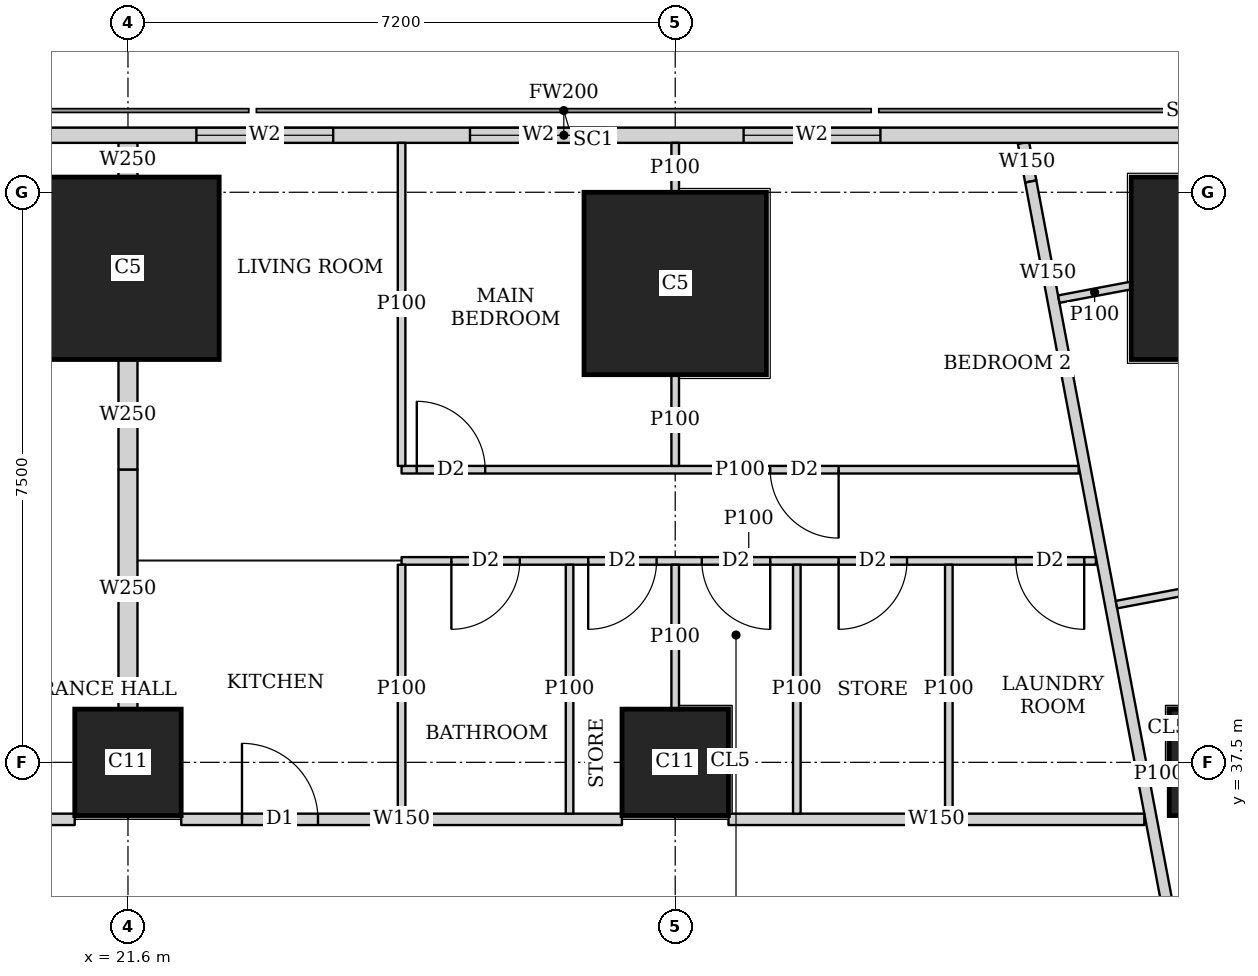
"""IFC4 building model, lengths in metres.
Left out: names, types, materials, properties, quantities, classifications, styles, units other than length and angle.
Written with IfcOpenShell. Run it as: python <this file> out.ifc"""

import sys

from ifc_helpers import new_model, si_unit, direction, frame, frame_2d, origin, origin_2d, place, context, subcontext, project, spatial, rectangle, extrude, element, fill, save


model = new_model("IFC4")
c1 = context("Model", 3, precision=1e-05, world=origin(), true_north=direction((0.0, 1.0)))
c2 = subcontext(c1, "Body", "Model", "MODEL_VIEW")
j1 = project(units=[si_unit("LENGTHUNIT", "METRE"), si_unit("PLANEANGLEUNIT", "RADIAN")], contexts=[c1])
p1 = place(None, origin())
s1 = spatial("IfcSite", under=j1, at=p1, CompositionType="ELEMENT")
p2 = place(p1, origin())
s2 = spatial("IfcBuilding", under=s1, at=p2, CompositionType="ELEMENT")
p3 = place(p2, frame((0.0, 0.0, 242.45)))
s3 = spatial("IfcBuildingStorey", under=s2, at=p3, CompositionType="ELEMENT", Elevation=242.45)
for number, where, z_axis, x_axis in (
    (1, (21.6, 37.5, 0.0), (0.0, 0.0, 1.0), (1.0, 0.0, 0.0)),
    (2, (28.8, 37.5, 0.0), (0.0, 0.0, 1.0), (1.0, 0.0, 0.0)),
    (3, (36.0, 37.5, 0.0), (0.0, 0.0, 1.0), (1.0, 0.0, 0.0)),
):
    element("IfcColumn", number, at=place(p3, frame(where, z_axis=z_axis, x_axis=x_axis)), inside=s3, PredefinedType="COLUMN", context=c2, shape_type="SweptSolid", body=[
        extrude(rectangle(XDim=1.4, YDim=1.4, at=origin_2d()), origin(), (0.0, 0.0, 1.0), 3.75),
    ])
for number, where, z_axis, x_axis in (
    (4, (21.6, 44.0, 0.0), (0.0, 0.0, 1.0), (1.0, 0.0, 0.0)),
    (5, (28.8, 43.8, 0.0), (0.0, 0.0, 1.0), (1.0, 0.0, 0.0)),
    (6, (36.0, 44.0, 0.0), (0.0, 0.0, 1.0), (1.0, 0.0, 0.0)),
):
    element("IfcColumn", number, at=place(p3, frame(where, z_axis=z_axis, x_axis=x_axis)), inside=s3, PredefinedType="COLUMN", context=c2, shape_type="SweptSolid", body=[
        extrude(rectangle(XDim=2.4, YDim=2.4, at=origin_2d()), origin(), (0.0, 0.0, 1.0), 3.75),
    ])
p4 = place(p3, frame((40.106, 45.75, 0.0), z_axis=(0.0, 0.0, 1.0), x_axis=(-1.0, 0.0, 0.0)))
e7 = element("IfcWall", 7, at=p4, inside=s3, PredefinedType="SOLIDWALL", context=c2, shape_type="SweptSolid", body=[
    extrude(rectangle(XDim=25.543, YDim=0.2, at=frame_2d((12.771, 0.0))), origin(), (0.0, 0.0, 1.0), 3.45),
])
p5 = place(p4, frame((8.606, 0.0, 0.9)))
e8 = element("IfcOpeningElement", 8, at=p5, cuts=e7, PredefinedType="OPENING", context=c2, shape_type="SweptSolid", body=[
    extrude(rectangle(XDim=1.8, YDim=1.5, at=frame_2d((0.9, 0.75))), frame((0.0, 0.11, 0.0), z_axis=(0.0, -1.0, 0.0), x_axis=(1.0, 0.0, 0.0)), (0.0, 0.0, 1.0), 0.22),
])
p6 = place(p4, frame((12.206, 0.0, 0.9)))
e9 = element("IfcOpeningElement", 9, at=p6, cuts=e7, PredefinedType="OPENING", context=c2, shape_type="SweptSolid", body=[
    extrude(rectangle(XDim=1.8, YDim=1.5, at=frame_2d((0.9, 0.75))), frame((0.0, 0.11, 0.0), z_axis=(0.0, -1.0, 0.0), x_axis=(1.0, 0.0, 0.0)), (0.0, 0.0, 1.0), 0.22),
])
p7 = place(p4, frame((15.806, 0.0, 0.9)))
e10 = element("IfcOpeningElement", 10, at=p7, cuts=e7, PredefinedType="OPENING", context=c2, shape_type="SweptSolid", body=[
    extrude(rectangle(XDim=1.8, YDim=1.5, at=frame_2d((0.9, 0.75))), frame((0.0, 0.11, 0.0), z_axis=(0.0, -1.0, 0.0), x_axis=(1.0, 0.0, 0.0)), (0.0, 0.0, 1.0), 0.22),
])
p8 = place(p4, frame((20.825, 0.0, 0.9)))
e11 = element("IfcOpeningElement", 11, at=p8, cuts=e7, PredefinedType="OPENING", context=c2, shape_type="SweptSolid", body=[
    extrude(rectangle(XDim=2.4, YDim=1.5, at=frame_2d((1.2, 0.75))), frame((0.0, 0.11, 0.0), z_axis=(0.0, -1.0, 0.0), x_axis=(1.0, 0.0, 0.0)), (0.0, 0.0, 1.0), 0.22),
])
p9 = place(p3, frame((16.201, 36.75, 0.0), z_axis=(0.0, 0.0, 1.0), x_axis=(1.0, 0.0, 0.0)))
e12 = element("IfcWall", 12, at=p9, inside=s3, PredefinedType="SOLIDWALL", context=c2, shape_type="SweptSolid", body=[
    extrude(rectangle(XDim=4.698, YDim=0.15, at=frame_2d((2.349, 0.0))), origin(), (0.0, 0.0, 1.0), 3.45),
])
p10 = place(p9, frame((0.353, 0.0, 0.0)))
e13 = element("IfcOpeningElement", 13, at=p10, cuts=e12, PredefinedType="OPENING", context=c2, shape_type="SweptSolid", body=[
    extrude(rectangle(XDim=1.0, YDim=2.1, at=frame_2d((0.5, 1.05))), frame((0.0, 0.085, 0.0), z_axis=(0.0, -1.0, 0.0), x_axis=(1.0, 0.0, 0.0)), (0.0, 0.0, 1.0), 0.17),
])
p11 = place(p3, frame((22.301, 36.75, 0.0), z_axis=(0.0, 0.0, 1.0), x_axis=(1.0, 0.0, 0.0)))
e14 = element("IfcWall", 14, at=p11, inside=s3, PredefinedType="SOLIDWALL", context=c2, shape_type="SweptSolid", body=[
    extrude(rectangle(XDim=5.798, YDim=0.15, at=frame_2d((2.899, 0.0))), origin(), (0.0, 0.0, 1.0), 3.45),
])
p12 = place(p11, frame((0.799, 0.0, 0.0)))
e15 = element("IfcOpeningElement", 15, at=p12, cuts=e14, PredefinedType="OPENING", context=c2, shape_type="SweptSolid", body=[
    extrude(rectangle(XDim=1.0, YDim=2.1, at=frame_2d((0.5, 1.05))), frame((0.0, 0.085, 0.0), z_axis=(0.0, -1.0, 0.0), x_axis=(1.0, 0.0, 0.0)), (0.0, 0.0, 1.0), 0.17),
])
p13 = place(p3, frame((29.501, 36.75, 0.0), z_axis=(0.0, 0.0, 1.0), x_axis=(1.0, 0.0, 0.0)))
e16 = element("IfcWall", 16, at=p13, inside=s3, PredefinedType="SOLIDWALL", context=c2, shape_type="SweptSolid", body=[
    extrude(rectangle(XDim=5.471, YDim=0.15, at=frame_2d((2.735, 0.0))), origin(), (0.0, 0.0, 1.0), 3.45),
])
p14 = place(p3, frame((33.382, 45.65, 0.0), z_axis=(0.0, 0.0, 1.0), x_axis=(0.185657456326, -0.982614527122, 0.0)))
e17 = element("IfcWall", 17, at=p14, inside=s3, PredefinedType="SOLIDWALL", context=c2, shape_type="SweptSolid", body=[
    extrude(rectangle(XDim=0.517, YDim=0.15, at=frame_2d((0.258, 0.0))), origin(), (0.0, 0.0, 1.0), 3.45),
])
p15 = place(p3, frame((33.478, 45.142, 0.0), z_axis=(0.0, 0.0, 1.0), x_axis=(0.185393362436, -0.982664388876, 0.0)))
e18 = element("IfcWall", 18, at=p15, inside=s3, PredefinedType="SOLIDWALL", context=c2, shape_type="SweptSolid", body=[
    extrude(rectangle(XDim=2.455, YDim=0.15, at=frame_2d((1.227, 0.0))), origin(), (0.0, 0.0, 1.0), 2.0),
])
p16 = place(p3, frame((33.933, 42.73, 0.0), z_axis=(0.0, 0.0, 1.0), x_axis=(0.185595417643, -0.982626246825, 0.0)))
e19 = element("IfcWall", 19, at=p16, inside=s3, PredefinedType="SOLIDWALL", context=c2, shape_type="SweptSolid", body=[
    extrude(rectangle(XDim=41.051, YDim=0.15, at=frame_2d((20.525, 0.0))), origin(), (0.0, 0.0, 1.0), 2.45),
])
p17 = place(p16, frame((12.266, 0.0, 0.0)))
e20 = element("IfcOpeningElement", 20, at=p17, cuts=e19, PredefinedType="OPENING", context=c2, shape_type="SweptSolid", body=[
    extrude(rectangle(XDim=1.0, YDim=2.1, at=frame_2d((0.5, 1.05))), frame((0.0, 0.085, 0.0), z_axis=(0.0, -1.0, 0.0), x_axis=(1.0, 0.0, 0.0)), (0.0, 0.0, 1.0), 0.17),
])
p18 = place(p16, frame((16.082, 0.0, 0.0)))
e21 = element("IfcOpeningElement", 21, at=p18, cuts=e19, PredefinedType="OPENING", context=c2, shape_type="SweptSolid", body=[
    extrude(rectangle(XDim=1.0, YDim=2.1, at=frame_2d((0.5, 1.05))), frame((0.0, 0.085, 0.0), z_axis=(0.0, -1.0, 0.0), x_axis=(1.0, 0.0, 0.0)), (0.0, 0.0, 1.0), 0.17),
])
p19 = place(p16, frame((30.862, 0.0, 0.0)))
e22 = element("IfcOpeningElement", 22, at=p19, cuts=e19, PredefinedType="OPENING", context=c2, shape_type="SweptSolid", body=[
    extrude(rectangle(XDim=1.0, YDim=2.1, at=frame_2d((0.5, 1.05))), frame((0.0, 0.085, 0.0), z_axis=(0.0, -1.0, 0.0), x_axis=(1.0, 0.0, 0.0)), (0.0, 0.0, 1.0), 0.17),
])
p20 = place(p3, frame((34.79, 43.772, 0.0), z_axis=(0.0, 0.0, 1.0), x_axis=(-0.982655532093, -0.185440301034, 0.0)))
e23 = element("IfcWall", 23, at=p20, inside=s3, PredefinedType="PARTITIONING", context=c2, shape_type="SweptSolid", body=[
    extrude(rectangle(XDim=0.96, YDim=0.1, at=frame_2d((0.48, 0.0))), origin(), (0.0, 0.0, 1.0), 2.0),
])
p21 = place(p3, frame((37.823, 40.182, 0.0), z_axis=(0.0, 0.0, 1.0), x_axis=(-0.982664729897, -0.18539155487, 0.0)))
e24 = element("IfcWall", 24, at=p21, inside=s3, PredefinedType="PARTITIONING", context=c2, shape_type="SweptSolid", body=[
    extrude(rectangle(XDim=3.274, YDim=0.1, at=frame_2d((1.637, 0.0))), origin(), (0.0, 0.0, 1.0), 3.45),
])
p22 = place(p3, frame((35.29, 37.366, 0.0), z_axis=(0.0, 0.0, 1.0), x_axis=(-0.982395465615, -0.18681313963, 0.0)))
e25 = element("IfcWall", 25, at=p22, inside=s3, PredefinedType="PARTITIONING", context=c2, shape_type="SweptSolid", body=[
    extrude(rectangle(XDim=0.263, YDim=0.1, at=frame_2d((0.131, 0.0))), origin(), (0.0, 0.0, 1.0), 3.45),
])
p23 = place(p3, frame((25.2, 41.35, 0.0), z_axis=(0.0, 0.0, 1.0), x_axis=(1.0, 0.0, 0.0)))
e26 = element("IfcWall", 26, at=p23, inside=s3, PredefinedType="PARTITIONING", context=c2, shape_type="SweptSolid", body=[
    extrude(rectangle(XDim=8.908, YDim=0.1, at=frame_2d((4.454, 0.0))), origin(), (0.0, 0.0, 1.0), 3.45),
])
p24 = place(p23, frame((0.2, 0.0, 0.0)))
e27 = element("IfcOpeningElement", 27, at=p24, cuts=e26, PredefinedType="OPENING", context=c2, shape_type="SweptSolid", body=[
    extrude(rectangle(XDim=0.9, YDim=2.1, at=frame_2d((0.45, 1.05))), frame((0.0, 0.06, 0.0), z_axis=(0.0, -1.0, 0.0), x_axis=(1.0, 0.0, 0.0)), (0.0, 0.0, 1.0), 0.12),
])
p25 = place(p23, frame((4.85, 0.0, 0.0)))
e28 = element("IfcOpeningElement", 28, at=p25, cuts=e26, PredefinedType="OPENING", context=c2, shape_type="SweptSolid", body=[
    extrude(rectangle(XDim=0.9, YDim=2.1, at=frame_2d((0.45, 1.05))), frame((0.0, 0.06, 0.0), z_axis=(0.0, -1.0, 0.0), x_axis=(1.0, 0.0, 0.0)), (0.0, 0.0, 1.0), 0.12),
])
p26 = place(p3, frame((25.2, 40.15, 0.0), z_axis=(0.0, 0.0, 1.0), x_axis=(1.0, 0.0, 0.0)))
e29 = element("IfcWall", 29, at=p26, inside=s3, PredefinedType="PARTITIONING", context=c2, shape_type="SweptSolid", body=[
    extrude(rectangle(XDim=9.135, YDim=0.1, at=frame_2d((4.567, 0.0))), origin(), (0.0, 0.0, 1.0), 3.45),
])
p27 = place(p26, frame((0.655, 0.0, 0.0)))
e30 = element("IfcOpeningElement", 30, at=p27, cuts=e29, PredefinedType="OPENING", context=c2, shape_type="SweptSolid", body=[
    extrude(rectangle(XDim=0.9, YDim=2.1, at=frame_2d((0.45, 1.05))), frame((0.0, 0.06, 0.0), z_axis=(0.0, -1.0, 0.0), x_axis=(1.0, 0.0, 0.0)), (0.0, 0.0, 1.0), 0.12),
])
p28 = place(p26, frame((3.95, 0.0, 0.0)))
e31 = element("IfcOpeningElement", 31, at=p28, cuts=e29, PredefinedType="OPENING", context=c2, shape_type="SweptSolid", body=[
    extrude(rectangle(XDim=0.9, YDim=2.1, at=frame_2d((0.45, 1.05))), frame((0.0, 0.06, 0.0), z_axis=(0.0, -1.0, 0.0), x_axis=(1.0, 0.0, 0.0)), (0.0, 0.0, 1.0), 0.12),
])
p29 = place(p26, frame((8.081, 0.0, 0.0)))
e32 = element("IfcOpeningElement", 32, at=p29, cuts=e29, PredefinedType="OPENING", context=c2, shape_type="SweptSolid", body=[
    extrude(rectangle(XDim=0.9, YDim=2.1, at=frame_2d((0.45, 1.05))), frame((0.0, 0.06, 0.0), z_axis=(0.0, -1.0, 0.0), x_axis=(1.0, 0.0, 0.0)), (0.0, 0.0, 1.0), 0.12),
])
p30 = place(p26, frame((2.455, 0.0, 0.0)))
e33 = element("IfcOpeningElement", 33, at=p30, cuts=e29, PredefinedType="OPENING", context=c2, shape_type="SweptSolid", body=[
    extrude(rectangle(XDim=0.9, YDim=2.1, at=frame_2d((0.45, 1.05))), frame((0.0, 0.06, 0.0), z_axis=(0.0, -1.0, 0.0), x_axis=(1.0, 0.0, 0.0)), (0.0, 0.0, 1.0), 0.12),
])
p31 = place(p26, frame((5.75, 0.0, 0.0)))
e34 = element("IfcOpeningElement", 34, at=p31, cuts=e29, PredefinedType="OPENING", context=c2, shape_type="SweptSolid", body=[
    extrude(rectangle(XDim=0.9, YDim=2.1, at=frame_2d((0.45, 1.05))), frame((0.0, 0.06, 0.0), z_axis=(0.0, -1.0, 0.0), x_axis=(1.0, 0.0, 0.0)), (0.0, 0.0, 1.0), 0.12),
])
p32 = place(p3, frame((25.2, 41.4, 0.0), z_axis=(0.0, 0.0, 1.0), x_axis=(0.0, 1.0, 0.0)))
e35 = element("IfcWall", 35, at=p32, inside=s3, PredefinedType="PARTITIONING", context=c2, shape_type="SweptSolid", body=[
    extrude(rectangle(XDim=4.25, YDim=0.1, at=frame_2d((2.125, 0.0))), origin(), (0.0, 0.0, 1.0), 2.0),
])
p33 = place(p3, frame((28.8, 41.4, 0.0), z_axis=(0.0, 0.0, 1.0), x_axis=(0.0, 1.0, 0.0)))
e36 = element("IfcWall", 36, at=p33, inside=s3, PredefinedType="PARTITIONING", context=c2, shape_type="SweptSolid", body=[
    extrude(rectangle(XDim=1.199, YDim=0.1, at=frame_2d((0.6, 0.0))), origin(), (0.0, 0.0, 1.0), 3.45),
])
p34 = place(p3, frame((28.8, 45.001, 0.0), z_axis=(0.0, 0.0, 1.0), x_axis=(0.0, 1.0, 0.0)))
e37 = element("IfcWall", 37, at=p34, inside=s3, PredefinedType="PARTITIONING", context=c2, shape_type="SweptSolid", body=[
    extrude(rectangle(XDim=0.649, YDim=0.1, at=frame_2d((0.324, 0.0))), origin(), (0.0, 0.0, 1.0), 3.45),
])
p35 = place(p3, frame((25.2, 36.825, 0.0), z_axis=(0.0, 0.0, 1.0), x_axis=(0.0, 1.0, 0.0)))
e38 = element("IfcWall", 38, at=p35, inside=s3, PredefinedType="PARTITIONING", context=c2, shape_type="SweptSolid", body=[
    extrude(rectangle(XDim=3.275, YDim=0.1, at=frame_2d((1.638, 0.0))), origin(), (0.0, 0.0, 1.0), 3.45),
])
p36 = place(p3, frame((28.8, 38.201, 0.0), z_axis=(0.0, 0.0, 1.0), x_axis=(0.0, 1.0, 0.0)))
e39 = element("IfcWall", 39, at=p36, inside=s3, PredefinedType="PARTITIONING", context=c2, shape_type="SweptSolid", body=[
    extrude(rectangle(XDim=1.899, YDim=0.1, at=frame_2d((0.95, 0.0))), origin(), (0.0, 0.0, 1.0), 3.45),
])
for number, where, z_axis, x_axis in (
    (40, (32.4, 36.825, 0.0), (0.0, 0.0, 1.0), (0.0, 1.0, 0.0)),
    (41, (27.41, 36.825, 0.0), (0.0, 0.0, 1.0), (0.0, 1.0, 0.0)),
    (42, (30.4, 36.825, 0.0), (0.0, 0.0, 1.0), (0.0, 1.0, 0.0)),
):
    element("IfcWall", number, at=place(p3, frame(where, z_axis=z_axis, x_axis=x_axis)), inside=s3, PredefinedType="PARTITIONING", context=c2, shape_type="SweptSolid", body=[
        extrude(rectangle(XDim=3.275, YDim=0.1, at=frame_2d((1.638, 0.0))), origin(), (0.0, 0.0, 1.0), 3.45),
    ])
p37 = place(p3, frame((21.6, 41.35, 0.0), z_axis=(0.0, 0.0, 1.0), x_axis=(0.0, 1.0, 0.0)))
e43 = element("IfcWall", 43, at=p37, inside=s3, PredefinedType="SOLIDWALL", context=c2, shape_type="SweptSolid", body=[
    extrude(rectangle(XDim=1.449, YDim=0.25, at=frame_2d((0.725, 0.0))), origin(), (0.0, 0.0, 1.0), 2.0),
])
p38 = place(p3, frame((21.6, 45.201, 0.0), z_axis=(0.0, 0.0, 1.0), x_axis=(0.0, 1.0, 0.0)))
e44 = element("IfcWall", 44, at=p38, inside=s3, PredefinedType="SOLIDWALL", context=c2, shape_type="SweptSolid", body=[
    extrude(rectangle(XDim=0.449, YDim=0.25, at=frame_2d((0.225, 0.0))), origin(), (0.0, 0.0, 1.0), 2.0),
])
p39 = place(p3, frame((21.6, 38.201, 0.0), z_axis=(0.0, 0.0, 1.0), x_axis=(0.0, 1.0, 0.0)))
e45 = element("IfcWall", 45, at=p39, inside=s3, PredefinedType="SOLIDWALL", context=c2, shape_type="SweptSolid", body=[
    extrude(rectangle(XDim=3.149, YDim=0.25, at=frame_2d((1.575, 0.0))), origin(), (0.0, 0.0, 1.0), 3.45),
])
p40 = place(p5, origin())
e46 = element("IfcWindow", 46, at=p40, inside=s3, PartitioningType="SINGLE_PANEL", PredefinedType="WINDOW", context=c2, shape_type="SweptSolid", body=[
    extrude(rectangle(XDim=1.8, YDim=1.5, at=frame_2d((0.9, 0.75))), frame((0.0, 0.03, 0.0), z_axis=(0.0, -1.0, 0.0), x_axis=(1.0, 0.0, 0.0)), (0.0, 0.0, 1.0), 0.06),
])
fill(e8, e46)
p41 = place(p6, origin())
e47 = element("IfcWindow", 47, at=p41, inside=s3, PartitioningType="SINGLE_PANEL", PredefinedType="WINDOW", context=c2, shape_type="SweptSolid", body=[
    extrude(rectangle(XDim=1.8, YDim=1.5, at=frame_2d((0.9, 0.75))), frame((0.0, 0.03, 0.0), z_axis=(0.0, -1.0, 0.0), x_axis=(1.0, 0.0, 0.0)), (0.0, 0.0, 1.0), 0.06),
])
fill(e9, e47)
p42 = place(p7, origin())
e48 = element("IfcWindow", 48, at=p42, inside=s3, PartitioningType="SINGLE_PANEL", PredefinedType="WINDOW", context=c2, shape_type="SweptSolid", body=[
    extrude(rectangle(XDim=1.8, YDim=1.5, at=frame_2d((0.9, 0.75))), frame((0.0, 0.03, 0.0), z_axis=(0.0, -1.0, 0.0), x_axis=(1.0, 0.0, 0.0)), (0.0, 0.0, 1.0), 0.06),
])
fill(e10, e48)
p43 = place(p24, origin())
e49 = element("IfcDoor", 49, at=p43, inside=s3, OperationType="SINGLE_SWING_LEFT", PredefinedType="DOOR", context=c2, shape_type="SweptSolid", body=[
    extrude(rectangle(XDim=0.9, YDim=2.1, at=frame_2d((0.45, 1.05))), frame((0.0, 0.025, 0.0), z_axis=(0.0, -1.0, 0.0), x_axis=(1.0, 0.0, 0.0)), (0.0, 0.0, 1.0), 0.05),
])
fill(e27, e49)
p44 = place(p25, origin())
e50 = element("IfcDoor", 50, at=p44, inside=s3, OperationType="SINGLE_SWING_LEFT", PredefinedType="DOOR", context=c2, shape_type="SweptSolid", body=[
    extrude(rectangle(XDim=0.9, YDim=2.1, at=frame_2d((0.45, 1.05))), frame((0.0, 0.025, 0.0), z_axis=(0.0, -1.0, 0.0), x_axis=(1.0, 0.0, 0.0)), (0.0, 0.0, 1.0), 0.05),
])
fill(e28, e50)
p45 = place(p27, origin())
e51 = element("IfcDoor", 51, at=p45, inside=s3, OperationType="SINGLE_SWING_RIGHT", PredefinedType="DOOR", context=c2, shape_type="SweptSolid", body=[
    extrude(rectangle(XDim=0.9, YDim=2.1, at=frame_2d((0.45, 1.05))), frame((0.0, 0.025, 0.0), z_axis=(0.0, -1.0, 0.0), x_axis=(1.0, 0.0, 0.0)), (0.0, 0.0, 1.0), 0.05),
])
fill(e30, e51)
p46 = place(p28, origin())
e52 = element("IfcDoor", 52, at=p46, inside=s3, OperationType="SINGLE_SWING_LEFT", PredefinedType="DOOR", context=c2, shape_type="SweptSolid", body=[
    extrude(rectangle(XDim=0.9, YDim=2.1, at=frame_2d((0.45, 1.05))), frame((0.0, 0.025, 0.0), z_axis=(0.0, -1.0, 0.0), x_axis=(1.0, 0.0, 0.0)), (0.0, 0.0, 1.0), 0.05),
])
fill(e31, e52)
p47 = place(p29, origin())
e53 = element("IfcDoor", 53, at=p47, inside=s3, OperationType="SINGLE_SWING_LEFT", PredefinedType="DOOR", context=c2, shape_type="SweptSolid", body=[
    extrude(rectangle(XDim=0.9, YDim=2.1, at=frame_2d((0.45, 1.05))), frame((0.0, 0.025, 0.0), z_axis=(0.0, -1.0, 0.0), x_axis=(1.0, 0.0, 0.0)), (0.0, 0.0, 1.0), 0.05),
])
fill(e32, e53)
p48 = place(p30, origin())
e54 = element("IfcDoor", 54, at=p48, inside=s3, OperationType="SINGLE_SWING_RIGHT", PredefinedType="DOOR", context=c2, shape_type="SweptSolid", body=[
    extrude(rectangle(XDim=0.9, YDim=2.1, at=frame_2d((0.45, 1.05))), frame((0.0, 0.025, 0.0), z_axis=(0.0, -1.0, 0.0), x_axis=(1.0, 0.0, 0.0)), (0.0, 0.0, 1.0), 0.05),
])
fill(e33, e54)
p49 = place(p31, origin())
e55 = element("IfcDoor", 55, at=p49, inside=s3, OperationType="SINGLE_SWING_RIGHT", PredefinedType="DOOR", context=c2, shape_type="SweptSolid", body=[
    extrude(rectangle(XDim=0.9, YDim=2.1, at=frame_2d((0.45, 1.05))), frame((0.0, 0.025, 0.0), z_axis=(0.0, -1.0, 0.0), x_axis=(1.0, 0.0, 0.0)), (0.0, 0.0, 1.0), 0.05),
])
fill(e34, e55)
p50 = place(p12, origin())
e56 = element("IfcDoor", 56, at=p50, inside=s3, OperationType="SINGLE_SWING_LEFT", PredefinedType="DOOR", context=c2, shape_type="SweptSolid", body=[
    extrude(rectangle(XDim=1.0, YDim=2.1, at=frame_2d((0.5, 1.05))), frame((0.0, 0.025, 0.0), z_axis=(0.0, -1.0, 0.0), x_axis=(1.0, 0.0, 0.0)), (0.0, 0.0, 1.0), 0.05),
])
fill(e15, e56)
save(model, sys.argv[1])
